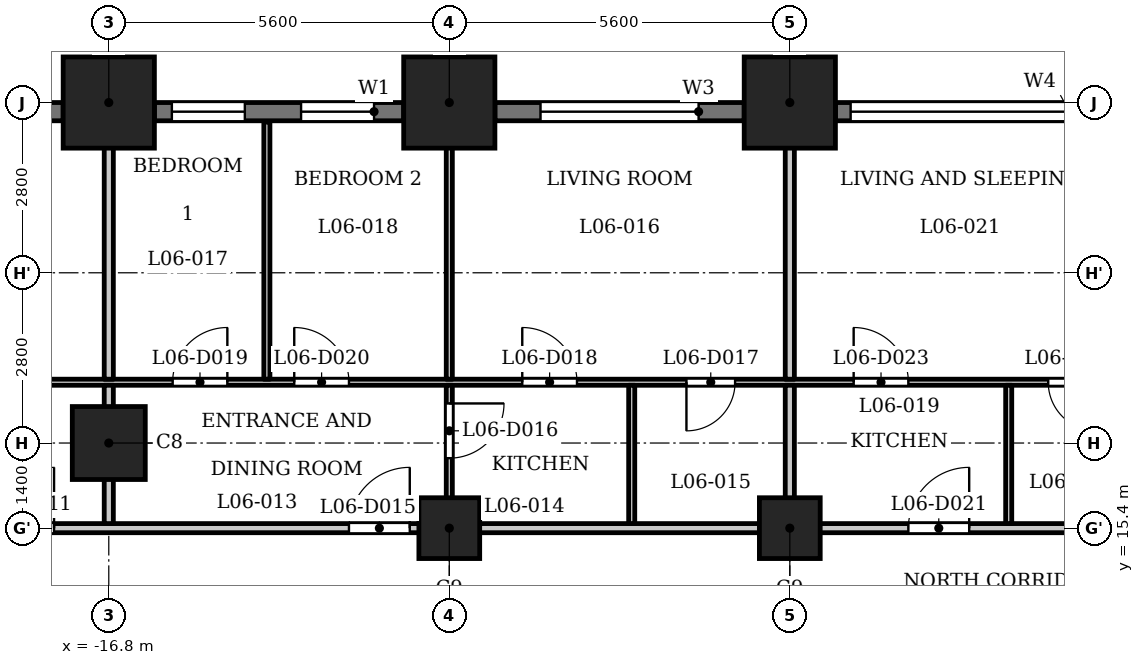
"""IFC4 building model, lengths in metres.
Left out: names, types, materials, properties, quantities, classifications, styles, units other than length and angle.
Written with IfcOpenShell. Run it as: python <this file> out.ifc"""

import sys

from ifc_helpers import new_model, si_unit, direction, frame, frame_2d, origin, origin_2d, place, context, subcontext, project, spatial, rectangle, extrude, element, fill, save


model = new_model("IFC4")
c1 = context("Model", 3, precision=1e-05, world=origin(), true_north=direction((0.0, 1.0)))
c2 = subcontext(c1, "Body", "Model", "MODEL_VIEW")
j1 = project(units=[si_unit("LENGTHUNIT", "METRE"), si_unit("PLANEANGLEUNIT", "RADIAN")], contexts=[c1])
p1 = place(None, origin())
s1 = spatial("IfcSite", under=j1, at=p1, CompositionType="ELEMENT")
p2 = place(p1, origin())
s2 = spatial("IfcBuilding", under=s1, at=p2, CompositionType="ELEMENT")
p3 = place(p2, frame((0.0, 0.0, 30.5)))
s3 = spatial("IfcBuildingStorey", under=s2, at=p3, CompositionType="ELEMENT", Elevation=30.5)
for number, where, z_axis, x_axis in (
    (1, (-5.6, 22.4, 0.0), (0.0, 0.0, 1.0), (1.0, 0.0, 0.0)),
    (2, (-11.2, 22.4, 0.0), (0.0, 0.0, 1.0), (1.0, 0.0, 0.0)),
    (3, (-16.8, 22.4, 0.0), (0.0, 0.0, 1.0), (1.0, 0.0, 0.0)),
):
    element("IfcColumn", number, at=place(p3, frame(where, z_axis=z_axis, x_axis=x_axis)), inside=s3, PredefinedType="COLUMN", context=c2, shape_type="SweptSolid", body=[
        extrude(rectangle(XDim=1.5, YDim=1.5, at=origin_2d()), origin(), (0.0, 0.0, 1.0), 3.5),
    ])
p4 = place(p3, frame((-16.8, 16.8, 0.0), z_axis=(0.0, 0.0, 1.0), x_axis=(1.0, 0.0, 0.0)))
e4 = element("IfcColumn", 4, at=p4, inside=s3, PredefinedType="COLUMN", context=c2, shape_type="SweptSolid", body=[
    extrude(rectangle(XDim=1.2, YDim=1.2, at=origin_2d()), origin(), (0.0, 0.0, 1.0), 3.5),
])
for number, where, z_axis, x_axis in (
    (5, (-11.2, 15.4, 0.0), (0.0, 0.0, 1.0), (1.0, 0.0, 0.0)),
    (6, (-5.6, 15.4, 0.0), (0.0, 0.0, 1.0), (1.0, 0.0, 0.0)),
):
    element("IfcColumn", number, at=place(p3, frame(where, z_axis=z_axis, x_axis=x_axis)), inside=s3, PredefinedType="COLUMN", context=c2, shape_type="SweptSolid", body=[
        extrude(rectangle(XDim=1.0, YDim=1.0, at=origin_2d()), origin(), (0.0, 0.0, 1.0), 3.5),
    ])
p5 = place(p3, frame((-0.75, 22.25, 0.0), z_axis=(0.0, 0.0, 1.0), x_axis=(-1.0, 0.0, 0.0)))
e7 = element("IfcWall", 7, at=p5, inside=s3, PredefinedType="SOLIDWALL", context=c2, shape_type="SweptSolid", body=[
    extrude(rectangle(XDim=4.1, YDim=0.3, at=frame_2d((2.05, 0.0))), origin(), (0.0, 0.0, 1.0), 2.35),
])
p6 = place(p5, frame((0.25, 0.0, 1.2)))
e8 = element("IfcOpeningElement", 8, at=p6, cuts=e7, PredefinedType="OPENING", context=c2, shape_type="SweptSolid", body=[
    extrude(rectangle(XDim=3.6, YDim=0.95, at=frame_2d((1.8, 0.475))), frame((0.0, 0.16, 0.0), z_axis=(0.0, -1.0, 0.0), x_axis=(1.0, 0.0, 0.0)), (0.0, 0.0, 1.0), 0.32),
])
p7 = place(p3, frame((-6.35, 22.25, 0.0), z_axis=(0.0, 0.0, 1.0), x_axis=(-1.0, 0.0, 0.0)))
e9 = element("IfcWall", 9, at=p7, inside=s3, PredefinedType="SOLIDWALL", context=c2, shape_type="SweptSolid", body=[
    extrude(rectangle(XDim=4.1, YDim=0.3, at=frame_2d((2.05, 0.0))), origin(), (0.0, 0.0, 1.0), 2.35),
])
p8 = place(p7, frame((0.75, 0.0, 0.9)))
e10 = element("IfcOpeningElement", 10, at=p8, cuts=e9, PredefinedType="OPENING", context=c2, shape_type="SweptSolid", body=[
    extrude(rectangle(XDim=2.6, YDim=1.25, at=frame_2d((1.3, 0.625))), frame((0.0, 0.16, 0.0), z_axis=(0.0, -1.0, 0.0), x_axis=(1.0, 0.0, 0.0)), (0.0, 0.0, 1.0), 0.32),
])
p9 = place(p3, frame((-11.95, 22.25, 0.0), z_axis=(0.0, 0.0, 1.0), x_axis=(-1.0, 0.0, 0.0)))
e11 = element("IfcWall", 11, at=p9, inside=s3, PredefinedType="SOLIDWALL", context=c2, shape_type="SweptSolid", body=[
    extrude(rectangle(XDim=4.1, YDim=0.3, at=frame_2d((2.05, 0.0))), origin(), (0.0, 0.0, 1.0), 2.35),
])
p10 = place(p9, frame((0.488, 0.0, 0.6)))
e12 = element("IfcOpeningElement", 12, at=p10, cuts=e11, PredefinedType="OPENING", context=c2, shape_type="SweptSolid", body=[
    extrude(rectangle(XDim=1.2, YDim=1.55, at=frame_2d((0.6, 0.775))), frame((0.0, 0.16, 0.0), z_axis=(0.0, -1.0, 0.0), x_axis=(1.0, 0.0, 0.0)), (0.0, 0.0, 1.0), 0.32),
])
p11 = place(p9, frame((2.613, 0.0, 0.6)))
e13 = element("IfcOpeningElement", 13, at=p11, cuts=e11, PredefinedType="OPENING", context=c2, shape_type="SweptSolid", body=[
    extrude(rectangle(XDim=1.2, YDim=1.55, at=frame_2d((0.6, 0.775))), frame((0.0, 0.16, 0.0), z_axis=(0.0, -1.0, 0.0), x_axis=(1.0, 0.0, 0.0)), (0.0, 0.0, 1.0), 0.32),
])
p12 = place(p3, frame((-17.55, 22.25, 0.0), z_axis=(0.0, 0.0, 1.0), x_axis=(-1.0, 0.0, 0.0)))
e14 = element("IfcWall", 14, at=p12, inside=s3, PredefinedType="SOLIDWALL", context=c2, shape_type="SweptSolid", body=[
    extrude(rectangle(XDim=2.45, YDim=0.3, at=frame_2d((1.225, 0.0))), origin(), (0.0, 0.0, 1.0), 2.35),
])
p13 = place(p12, frame((0.625, 0.0, 0.6)))
e15 = element("IfcOpeningElement", 15, at=p13, cuts=e14, PredefinedType="OPENING", context=c2, shape_type="SweptSolid", body=[
    extrude(rectangle(XDim=1.2, YDim=1.55, at=frame_2d((0.6, 0.775))), frame((0.0, 0.16, 0.0), z_axis=(0.0, -1.0, 0.0), x_axis=(1.0, 0.0, 0.0)), (0.0, 0.0, 1.0), 0.32),
])
p14 = place(p3, frame((-27.484, 15.4, 0.0), z_axis=(0.0, 0.0, 1.0), x_axis=(1.0, 0.0, 0.0)))
e16 = element("IfcWall", 16, at=p14, inside=s3, PredefinedType="PARTITIONING", context=c2, shape_type="SweptSolid", body=[
    extrude(rectangle(XDim=54.968, YDim=0.15, at=frame_2d((27.484, 0.0))), origin(), (0.0, 0.0, 1.0), 3.2),
])
p15 = place(p14, frame((8.784, 0.0, 0.0)))
e17 = element("IfcOpeningElement", 17, at=p15, cuts=e16, PredefinedType="OPENING", context=c2, shape_type="SweptSolid", body=[
    extrude(rectangle(XDim=1.0, YDim=2.1, at=frame_2d((0.5, 1.05))), frame((0.0, 0.085, 0.0), z_axis=(0.0, -1.0, 0.0), x_axis=(1.0, 0.0, 0.0)), (0.0, 0.0, 1.0), 0.17),
])
p16 = place(p14, frame((14.634, 0.0, 0.0)))
e18 = element("IfcOpeningElement", 18, at=p16, cuts=e16, PredefinedType="OPENING", context=c2, shape_type="SweptSolid", body=[
    extrude(rectangle(XDim=1.0, YDim=2.1, at=frame_2d((0.5, 1.05))), frame((0.0, 0.085, 0.0), z_axis=(0.0, -1.0, 0.0), x_axis=(1.0, 0.0, 0.0)), (0.0, 0.0, 1.0), 0.17),
])
p17 = place(p14, frame((23.834, 0.0, 0.0)))
e19 = element("IfcOpeningElement", 19, at=p17, cuts=e16, PredefinedType="OPENING", context=c2, shape_type="SweptSolid", body=[
    extrude(rectangle(XDim=1.0, YDim=2.1, at=frame_2d((0.5, 1.05))), frame((0.0, 0.085, 0.0), z_axis=(0.0, -1.0, 0.0), x_axis=(1.0, 0.0, 0.0)), (0.0, 0.0, 1.0), 0.17),
])
p18 = place(p14, frame((28.184, 0.0, 0.0)))
e20 = element("IfcOpeningElement", 20, at=p18, cuts=e16, PredefinedType="OPENING", context=c2, shape_type="SweptSolid", body=[
    extrude(rectangle(XDim=1.0, YDim=2.1, at=frame_2d((0.5, 1.05))), frame((0.0, 0.085, 0.0), z_axis=(0.0, -1.0, 0.0), x_axis=(1.0, 0.0, 0.0)), (0.0, 0.0, 1.0), 0.17),
])
p19 = place(p14, frame((41.884, 0.0, 0.0)))
e21 = element("IfcOpeningElement", 21, at=p19, cuts=e16, PredefinedType="OPENING", context=c2, shape_type="SweptSolid", body=[
    extrude(rectangle(XDim=1.0, YDim=2.1, at=frame_2d((0.5, 1.05))), frame((0.0, 0.085, 0.0), z_axis=(0.0, -1.0, 0.0), x_axis=(1.0, 0.0, 0.0)), (0.0, 0.0, 1.0), 0.17),
])
p20 = place(p14, frame((48.234, 0.0, 0.0)))
e22 = element("IfcOpeningElement", 22, at=p20, cuts=e16, PredefinedType="OPENING", context=c2, shape_type="SweptSolid", body=[
    extrude(rectangle(XDim=1.0, YDim=2.1, at=frame_2d((0.5, 1.05))), frame((0.0, 0.085, 0.0), z_axis=(0.0, -1.0, 0.0), x_axis=(1.0, 0.0, 0.0)), (0.0, 0.0, 1.0), 0.17),
])
p21 = place(p3, frame((-26.732, 17.8, 0.0), z_axis=(0.0, 0.0, 1.0), x_axis=(1.0, 0.0, 0.0)))
e23 = element("IfcWall", 23, at=p21, inside=s3, PredefinedType="PARTITIONING", context=c2, shape_type="SweptSolid", body=[
    extrude(rectangle(XDim=53.126, YDim=0.1, at=frame_2d((26.563, 0.0))), origin(), (0.0, 0.0, 1.0), 3.2),
])
p22 = place(p21, frame((2.964, 0.0, 0.0)))
e24 = element("IfcOpeningElement", 24, at=p22, cuts=e23, PredefinedType="OPENING", context=c2, shape_type="SweptSolid", body=[
    extrude(rectangle(XDim=0.8, YDim=2.1, at=frame_2d((0.4, 1.05))), frame((0.0, 0.06, 0.0), z_axis=(0.0, -1.0, 0.0), x_axis=(1.0, 0.0, 0.0)), (0.0, 0.0, 1.0), 0.12),
])
p23 = place(p21, frame((7.132, 0.0, 0.0)))
e25 = element("IfcOpeningElement", 25, at=p23, cuts=e23, PredefinedType="OPENING", context=c2, shape_type="SweptSolid", body=[
    extrude(rectangle(XDim=0.9, YDim=2.1, at=frame_2d((0.45, 1.05))), frame((0.0, 0.06, 0.0), z_axis=(0.0, -1.0, 0.0), x_axis=(1.0, 0.0, 0.0)), (0.0, 0.0, 1.0), 0.12),
])
p24 = place(p21, frame((19.432, 0.0, 0.0)))
e26 = element("IfcOpeningElement", 26, at=p24, cuts=e23, PredefinedType="OPENING", context=c2, shape_type="SweptSolid", body=[
    extrude(rectangle(XDim=0.8, YDim=2.1, at=frame_2d((0.4, 1.05))), frame((0.0, 0.06, 0.0), z_axis=(0.0, -1.0, 0.0), x_axis=(1.0, 0.0, 0.0)), (0.0, 0.0, 1.0), 0.12),
])
p25 = place(p21, frame((16.732, 0.0, 0.0)))
e27 = element("IfcOpeningElement", 27, at=p25, cuts=e23, PredefinedType="OPENING", context=c2, shape_type="SweptSolid", body=[
    extrude(rectangle(XDim=0.9, YDim=2.1, at=frame_2d((0.45, 1.05))), frame((0.0, 0.06, 0.0), z_axis=(0.0, -1.0, 0.0), x_axis=(1.0, 0.0, 0.0)), (0.0, 0.0, 1.0), 0.12),
])
p26 = place(p21, frame((10.982, 0.0, 0.0)))
e28 = element("IfcOpeningElement", 28, at=p26, cuts=e23, PredefinedType="OPENING", context=c2, shape_type="SweptSolid", body=[
    extrude(rectangle(XDim=0.9, YDim=2.1, at=frame_2d((0.45, 1.05))), frame((0.0, 0.06, 0.0), z_axis=(0.0, -1.0, 0.0), x_axis=(1.0, 0.0, 0.0)), (0.0, 0.0, 1.0), 0.12),
])
p27 = place(p21, frame((12.982, 0.0, 0.0)))
e29 = element("IfcOpeningElement", 29, at=p27, cuts=e23, PredefinedType="OPENING", context=c2, shape_type="SweptSolid", body=[
    extrude(rectangle(XDim=0.9, YDim=2.1, at=frame_2d((0.45, 1.05))), frame((0.0, 0.06, 0.0), z_axis=(0.0, -1.0, 0.0), x_axis=(1.0, 0.0, 0.0)), (0.0, 0.0, 1.0), 0.12),
])
p28 = place(p21, frame((25.382, 0.0, 0.0)))
e30 = element("IfcOpeningElement", 30, at=p28, cuts=e23, PredefinedType="OPENING", context=c2, shape_type="SweptSolid", body=[
    extrude(rectangle(XDim=0.8, YDim=2.1, at=frame_2d((0.4, 1.05))), frame((0.0, 0.06, 0.0), z_axis=(0.0, -1.0, 0.0), x_axis=(1.0, 0.0, 0.0)), (0.0, 0.0, 1.0), 0.12),
])
p29 = place(p21, frame((22.182, 0.0, 0.0)))
e31 = element("IfcOpeningElement", 31, at=p29, cuts=e23, PredefinedType="OPENING", context=c2, shape_type="SweptSolid", body=[
    extrude(rectangle(XDim=0.9, YDim=2.1, at=frame_2d((0.45, 1.05))), frame((0.0, 0.06, 0.0), z_axis=(0.0, -1.0, 0.0), x_axis=(1.0, 0.0, 0.0)), (0.0, 0.0, 1.0), 0.12),
])
p30 = place(p21, frame((36.232, 0.0, 0.0)))
e32 = element("IfcOpeningElement", 32, at=p30, cuts=e23, PredefinedType="OPENING", context=c2, shape_type="SweptSolid", body=[
    extrude(rectangle(XDim=0.8, YDim=2.1, at=frame_2d((0.4, 1.05))), frame((0.0, 0.06, 0.0), z_axis=(0.0, -1.0, 0.0), x_axis=(1.0, 0.0, 0.0)), (0.0, 0.0, 1.0), 0.12),
])
p31 = place(p21, frame((33.782, 0.0, 0.0)))
e33 = element("IfcOpeningElement", 33, at=p31, cuts=e23, PredefinedType="OPENING", context=c2, shape_type="SweptSolid", body=[
    extrude(rectangle(XDim=0.9, YDim=2.1, at=frame_2d((0.45, 1.05))), frame((0.0, 0.06, 0.0), z_axis=(0.0, -1.0, 0.0), x_axis=(1.0, 0.0, 0.0)), (0.0, 0.0, 1.0), 0.12),
])
p32 = place(p21, frame((27.282, 0.0, 0.0)))
e34 = element("IfcOpeningElement", 34, at=p32, cuts=e23, PredefinedType="OPENING", context=c2, shape_type="SweptSolid", body=[
    extrude(rectangle(XDim=0.9, YDim=2.1, at=frame_2d((0.45, 1.05))), frame((0.0, 0.06, 0.0), z_axis=(0.0, -1.0, 0.0), x_axis=(1.0, 0.0, 0.0)), (0.0, 0.0, 1.0), 0.12),
])
p33 = place(p21, frame((30.282, 0.0, 0.0)))
e35 = element("IfcOpeningElement", 35, at=p33, cuts=e23, PredefinedType="OPENING", context=c2, shape_type="SweptSolid", body=[
    extrude(rectangle(XDim=0.9, YDim=2.1, at=frame_2d((0.45, 1.05))), frame((0.0, 0.06, 0.0), z_axis=(0.0, -1.0, 0.0), x_axis=(1.0, 0.0, 0.0)), (0.0, 0.0, 1.0), 0.12),
])
p34 = place(p21, frame((38.582, 0.0, 0.0)))
e36 = element("IfcOpeningElement", 36, at=p34, cuts=e23, PredefinedType="OPENING", context=c2, shape_type="SweptSolid", body=[
    extrude(rectangle(XDim=0.8, YDim=2.1, at=frame_2d((0.4, 1.05))), frame((0.0, 0.06, 0.0), z_axis=(0.0, -1.0, 0.0), x_axis=(1.0, 0.0, 0.0)), (0.0, 0.0, 1.0), 0.12),
])
p35 = place(p21, frame((41.232, 0.0, 0.0)))
e37 = element("IfcOpeningElement", 37, at=p35, cuts=e23, PredefinedType="OPENING", context=c2, shape_type="SweptSolid", body=[
    extrude(rectangle(XDim=0.9, YDim=2.1, at=frame_2d((0.45, 1.05))), frame((0.0, 0.06, 0.0), z_axis=(0.0, -1.0, 0.0), x_axis=(1.0, 0.0, 0.0)), (0.0, 0.0, 1.0), 0.12),
])
p36 = place(p21, frame((51.532, 0.0, 0.0)))
e38 = element("IfcOpeningElement", 38, at=p36, cuts=e23, PredefinedType="OPENING", context=c2, shape_type="SweptSolid", body=[
    extrude(rectangle(XDim=0.8, YDim=2.1, at=frame_2d((0.4, 1.05))), frame((0.0, 0.06, 0.0), z_axis=(0.0, -1.0, 0.0), x_axis=(1.0, 0.0, 0.0)), (0.0, 0.0, 1.0), 0.12),
])
p37 = place(p21, frame((46.582, 0.0, 0.0)))
e39 = element("IfcOpeningElement", 39, at=p37, cuts=e23, PredefinedType="OPENING", context=c2, shape_type="SweptSolid", body=[
    extrude(rectangle(XDim=0.9, YDim=2.1, at=frame_2d((0.45, 1.05))), frame((0.0, 0.06, 0.0), z_axis=(0.0, -1.0, 0.0), x_axis=(1.0, 0.0, 0.0)), (0.0, 0.0, 1.0), 0.12),
])
p38 = place(p3, frame((-16.8, 15.475, 0.0), z_axis=(0.0, 0.0, 1.0), x_axis=(0.0, 1.0, 0.0)))
e40 = element("IfcWall", 40, at=p38, inside=s3, PredefinedType="PARTITIONING", context=c2, shape_type="SweptSolid", body=[
    extrude(rectangle(XDim=2.275, YDim=0.15, at=frame_2d((1.137, 0.0))), origin(), (0.0, 0.0, 1.0), 3.2),
])
p39 = place(p3, frame((-16.8, 17.85, 0.0), z_axis=(0.0, 0.0, 1.0), x_axis=(0.0, 1.0, 0.0)))
e41 = element("IfcWall", 41, at=p39, inside=s3, PredefinedType="PARTITIONING", context=c2, shape_type="SweptSolid", body=[
    extrude(rectangle(XDim=5.28, YDim=0.15, at=frame_2d((2.64, 0.0))), origin(), (0.0, 0.0, 1.0), 3.2),
])
p40 = place(p3, frame((-14.2, 17.85, 0.0), z_axis=(0.0, 0.0, 1.0), x_axis=(0.0, 1.0, 0.0)))
e42 = element("IfcWall", 42, at=p40, inside=s3, PredefinedType="PARTITIONING", context=c2, shape_type="SweptSolid", body=[
    extrude(rectangle(XDim=4.23, YDim=0.1, at=frame_2d((2.115, 0.0))), origin(), (0.0, 0.0, 1.0), 3.2),
])
p41 = place(p3, frame((-11.2, 15.475, 0.0), z_axis=(0.0, 0.0, 1.0), x_axis=(0.0, 1.0, 0.0)))
e43 = element("IfcWall", 43, at=p41, inside=s3, PredefinedType="PARTITIONING", context=c2, shape_type="SweptSolid", body=[
    extrude(rectangle(XDim=2.275, YDim=0.1, at=frame_2d((1.137, 0.0))), origin(), (0.0, 0.0, 1.0), 3.2),
])
p42 = place(p41, frame((1.076, 0.0, 0.0)))
e44 = element("IfcOpeningElement", 44, at=p42, cuts=e43, PredefinedType="OPENING", context=c2, shape_type="SweptSolid", body=[
    extrude(rectangle(XDim=0.9, YDim=2.1, at=frame_2d((0.45, 1.05))), frame((0.0, 0.06, 0.0), z_axis=(0.0, -1.0, 0.0), x_axis=(1.0, 0.0, 0.0)), (0.0, 0.0, 1.0), 0.12),
])
p43 = place(p3, frame((-11.2, 17.85, 0.0), z_axis=(0.0, 0.0, 1.0), x_axis=(0.0, 1.0, 0.0)))
e45 = element("IfcWall", 45, at=p43, inside=s3, PredefinedType="PARTITIONING", context=c2, shape_type="SweptSolid", body=[
    extrude(rectangle(XDim=5.28, YDim=0.1, at=frame_2d((2.64, 0.0))), origin(), (0.0, 0.0, 1.0), 3.2),
])
p44 = place(p3, frame((-8.2, 15.475, 0.0), z_axis=(0.0, 0.0, 1.0), x_axis=(0.0, 1.0, 0.0)))
e46 = element("IfcWall", 46, at=p44, inside=s3, PredefinedType="PARTITIONING", context=c2, shape_type="SweptSolid", body=[
    extrude(rectangle(XDim=2.275, YDim=0.1, at=frame_2d((1.137, 0.0))), origin(), (0.0, 0.0, 1.0), 3.2),
])
p45 = place(p3, frame((-5.6, 15.475, 0.0), z_axis=(0.0, 0.0, 1.0), x_axis=(0.0, 1.0, 0.0)))
e47 = element("IfcWall", 47, at=p45, inside=s3, PredefinedType="PARTITIONING", context=c2, shape_type="SweptSolid", body=[
    extrude(rectangle(XDim=2.275, YDim=0.15, at=frame_2d((1.137, 0.0))), origin(), (0.0, 0.0, 1.0), 3.2),
])
p46 = place(p3, frame((-5.6, 17.85, 0.0), z_axis=(0.0, 0.0, 1.0), x_axis=(0.0, 1.0, 0.0)))
e48 = element("IfcWall", 48, at=p46, inside=s3, PredefinedType="PARTITIONING", context=c2, shape_type="SweptSolid", body=[
    extrude(rectangle(XDim=5.28, YDim=0.15, at=frame_2d((2.64, 0.0))), origin(), (0.0, 0.0, 1.0), 3.2),
])
p47 = place(p3, frame((-2.0, 15.475, 0.0), z_axis=(0.0, 0.0, 1.0), x_axis=(0.0, 1.0, 0.0)))
e49 = element("IfcWall", 49, at=p47, inside=s3, PredefinedType="PARTITIONING", context=c2, shape_type="SweptSolid", body=[
    extrude(rectangle(XDim=2.275, YDim=0.1, at=frame_2d((1.137, 0.0))), origin(), (0.0, 0.0, 1.0), 3.2),
])
p48 = place(p15, origin())
e50 = element("IfcDoor", 50, at=p48, inside=s3, OperationType="SINGLE_SWING_LEFT", PredefinedType="DOOR", context=c2, shape_type="SweptSolid", body=[
    extrude(rectangle(XDim=1.0, YDim=2.1, at=frame_2d((0.5, 1.05))), frame((0.0, 0.025, 0.0), z_axis=(0.0, -1.0, 0.0), x_axis=(1.0, 0.0, 0.0)), (0.0, 0.0, 1.0), 0.05),
])
fill(e17, e50)
p49 = place(p16, origin())
e51 = element("IfcDoor", 51, at=p49, inside=s3, OperationType="SINGLE_SWING_LEFT", PredefinedType="DOOR", context=c2, shape_type="SweptSolid", body=[
    extrude(rectangle(XDim=1.0, YDim=2.1, at=frame_2d((0.5, 1.05))), frame((0.0, 0.025, 0.0), z_axis=(0.0, -1.0, 0.0), x_axis=(1.0, 0.0, 0.0)), (0.0, 0.0, 1.0), 0.05),
])
fill(e18, e51)
p50 = place(p42, origin())
e52 = element("IfcDoor", 52, at=p50, inside=s3, OperationType="SINGLE_SWING_RIGHT", PredefinedType="DOOR", context=c2, shape_type="SweptSolid", body=[
    extrude(rectangle(XDim=0.9, YDim=2.1, at=frame_2d((0.45, 1.05))), frame((0.0, 0.025, 0.0), z_axis=(0.0, -1.0, 0.0), x_axis=(1.0, 0.0, 0.0)), (0.0, 0.0, 1.0), 0.05),
])
fill(e44, e52)
p51 = place(p24, origin())
e53 = element("IfcDoor", 53, at=p51, inside=s3, OperationType="SINGLE_SWING_LEFT", PredefinedType="DOOR", context=c2, shape_type="SweptSolid", body=[
    extrude(rectangle(XDim=0.8, YDim=2.1, at=frame_2d((0.4, 1.05))), frame((0.0, 0.025, 0.0), z_axis=(0.0, -1.0, 0.0), x_axis=(1.0, 0.0, 0.0)), (0.0, 0.0, 1.0), 0.05),
])
fill(e26, e53)
p52 = place(p25, origin())
e54 = element("IfcDoor", 54, at=p52, inside=s3, OperationType="SINGLE_SWING_RIGHT", PredefinedType="DOOR", context=c2, shape_type="SweptSolid", body=[
    extrude(rectangle(XDim=0.9, YDim=2.1, at=frame_2d((0.45, 1.05))), frame((0.0, 0.025, 0.0), z_axis=(0.0, -1.0, 0.0), x_axis=(1.0, 0.0, 0.0)), (0.0, 0.0, 1.0), 0.05),
])
fill(e27, e54)
p53 = place(p26, origin())
e55 = element("IfcDoor", 55, at=p53, inside=s3, OperationType="SINGLE_SWING_LEFT", PredefinedType="DOOR", context=c2, shape_type="SweptSolid", body=[
    extrude(rectangle(XDim=0.9, YDim=2.1, at=frame_2d((0.45, 1.05))), frame((0.0, 0.025, 0.0), z_axis=(0.0, -1.0, 0.0), x_axis=(1.0, 0.0, 0.0)), (0.0, 0.0, 1.0), 0.05),
])
fill(e28, e55)
p54 = place(p27, origin())
e56 = element("IfcDoor", 56, at=p54, inside=s3, OperationType="SINGLE_SWING_RIGHT", PredefinedType="DOOR", context=c2, shape_type="SweptSolid", body=[
    extrude(rectangle(XDim=0.9, YDim=2.1, at=frame_2d((0.45, 1.05))), frame((0.0, 0.025, 0.0), z_axis=(0.0, -1.0, 0.0), x_axis=(1.0, 0.0, 0.0)), (0.0, 0.0, 1.0), 0.05),
])
fill(e29, e56)
p55 = place(p17, origin())
e57 = element("IfcDoor", 57, at=p55, inside=s3, OperationType="SINGLE_SWING_LEFT", PredefinedType="DOOR", context=c2, shape_type="SweptSolid", body=[
    extrude(rectangle(XDim=1.0, YDim=2.1, at=frame_2d((0.5, 1.05))), frame((0.0, 0.025, 0.0), z_axis=(0.0, -1.0, 0.0), x_axis=(1.0, 0.0, 0.0)), (0.0, 0.0, 1.0), 0.05),
])
fill(e19, e57)
p56 = place(p28, origin())
e58 = element("IfcDoor", 58, at=p56, inside=s3, OperationType="SINGLE_SWING_RIGHT", PredefinedType="DOOR", context=c2, shape_type="SweptSolid", body=[
    extrude(rectangle(XDim=0.8, YDim=2.1, at=frame_2d((0.4, 1.05))), frame((0.0, 0.025, 0.0), z_axis=(0.0, -1.0, 0.0), x_axis=(1.0, 0.0, 0.0)), (0.0, 0.0, 1.0), 0.05),
])
fill(e30, e58)
p57 = place(p29, origin())
e59 = element("IfcDoor", 59, at=p57, inside=s3, OperationType="SINGLE_SWING_RIGHT", PredefinedType="DOOR", context=c2, shape_type="SweptSolid", body=[
    extrude(rectangle(XDim=0.9, YDim=2.1, at=frame_2d((0.45, 1.05))), frame((0.0, 0.025, 0.0), z_axis=(0.0, -1.0, 0.0), x_axis=(1.0, 0.0, 0.0)), (0.0, 0.0, 1.0), 0.05),
])
fill(e31, e59)
p58 = place(p6, origin())
e60 = element("IfcWindow", 60, at=p58, inside=s3, PartitioningType="SINGLE_PANEL", PredefinedType="WINDOW", context=c2, shape_type="SweptSolid", body=[
    extrude(rectangle(XDim=3.6, YDim=0.95, at=frame_2d((1.8, 0.475))), frame((0.0, 0.03, 0.0), z_axis=(0.0, -1.0, 0.0), x_axis=(1.0, 0.0, 0.0)), (0.0, 0.0, 1.0), 0.06),
])
fill(e8, e60)
p59 = place(p8, origin())
e61 = element("IfcWindow", 61, at=p59, inside=s3, PartitioningType="SINGLE_PANEL", PredefinedType="WINDOW", context=c2, shape_type="SweptSolid", body=[
    extrude(rectangle(XDim=2.6, YDim=1.25, at=frame_2d((1.3, 0.625))), frame((0.0, 0.03, 0.0), z_axis=(0.0, -1.0, 0.0), x_axis=(1.0, 0.0, 0.0)), (0.0, 0.0, 1.0), 0.06),
])
fill(e10, e61)
p60 = place(p10, origin())
e62 = element("IfcWindow", 62, at=p60, inside=s3, PartitioningType="SINGLE_PANEL", PredefinedType="WINDOW", context=c2, shape_type="SweptSolid", body=[
    extrude(rectangle(XDim=1.2, YDim=1.55, at=frame_2d((0.6, 0.775))), frame((0.0, 0.03, 0.0), z_axis=(0.0, -1.0, 0.0), x_axis=(1.0, 0.0, 0.0)), (0.0, 0.0, 1.0), 0.06),
])
fill(e12, e62)
p61 = place(p11, origin())
e63 = element("IfcWindow", 63, at=p61, inside=s3, PartitioningType="SINGLE_PANEL", PredefinedType="WINDOW", context=c2, shape_type="SweptSolid", body=[
    extrude(rectangle(XDim=1.2, YDim=1.55, at=frame_2d((0.6, 0.775))), frame((0.0, 0.03, 0.0), z_axis=(0.0, -1.0, 0.0), x_axis=(1.0, 0.0, 0.0)), (0.0, 0.0, 1.0), 0.06),
])
fill(e13, e63)
save(model, sys.argv[1])
